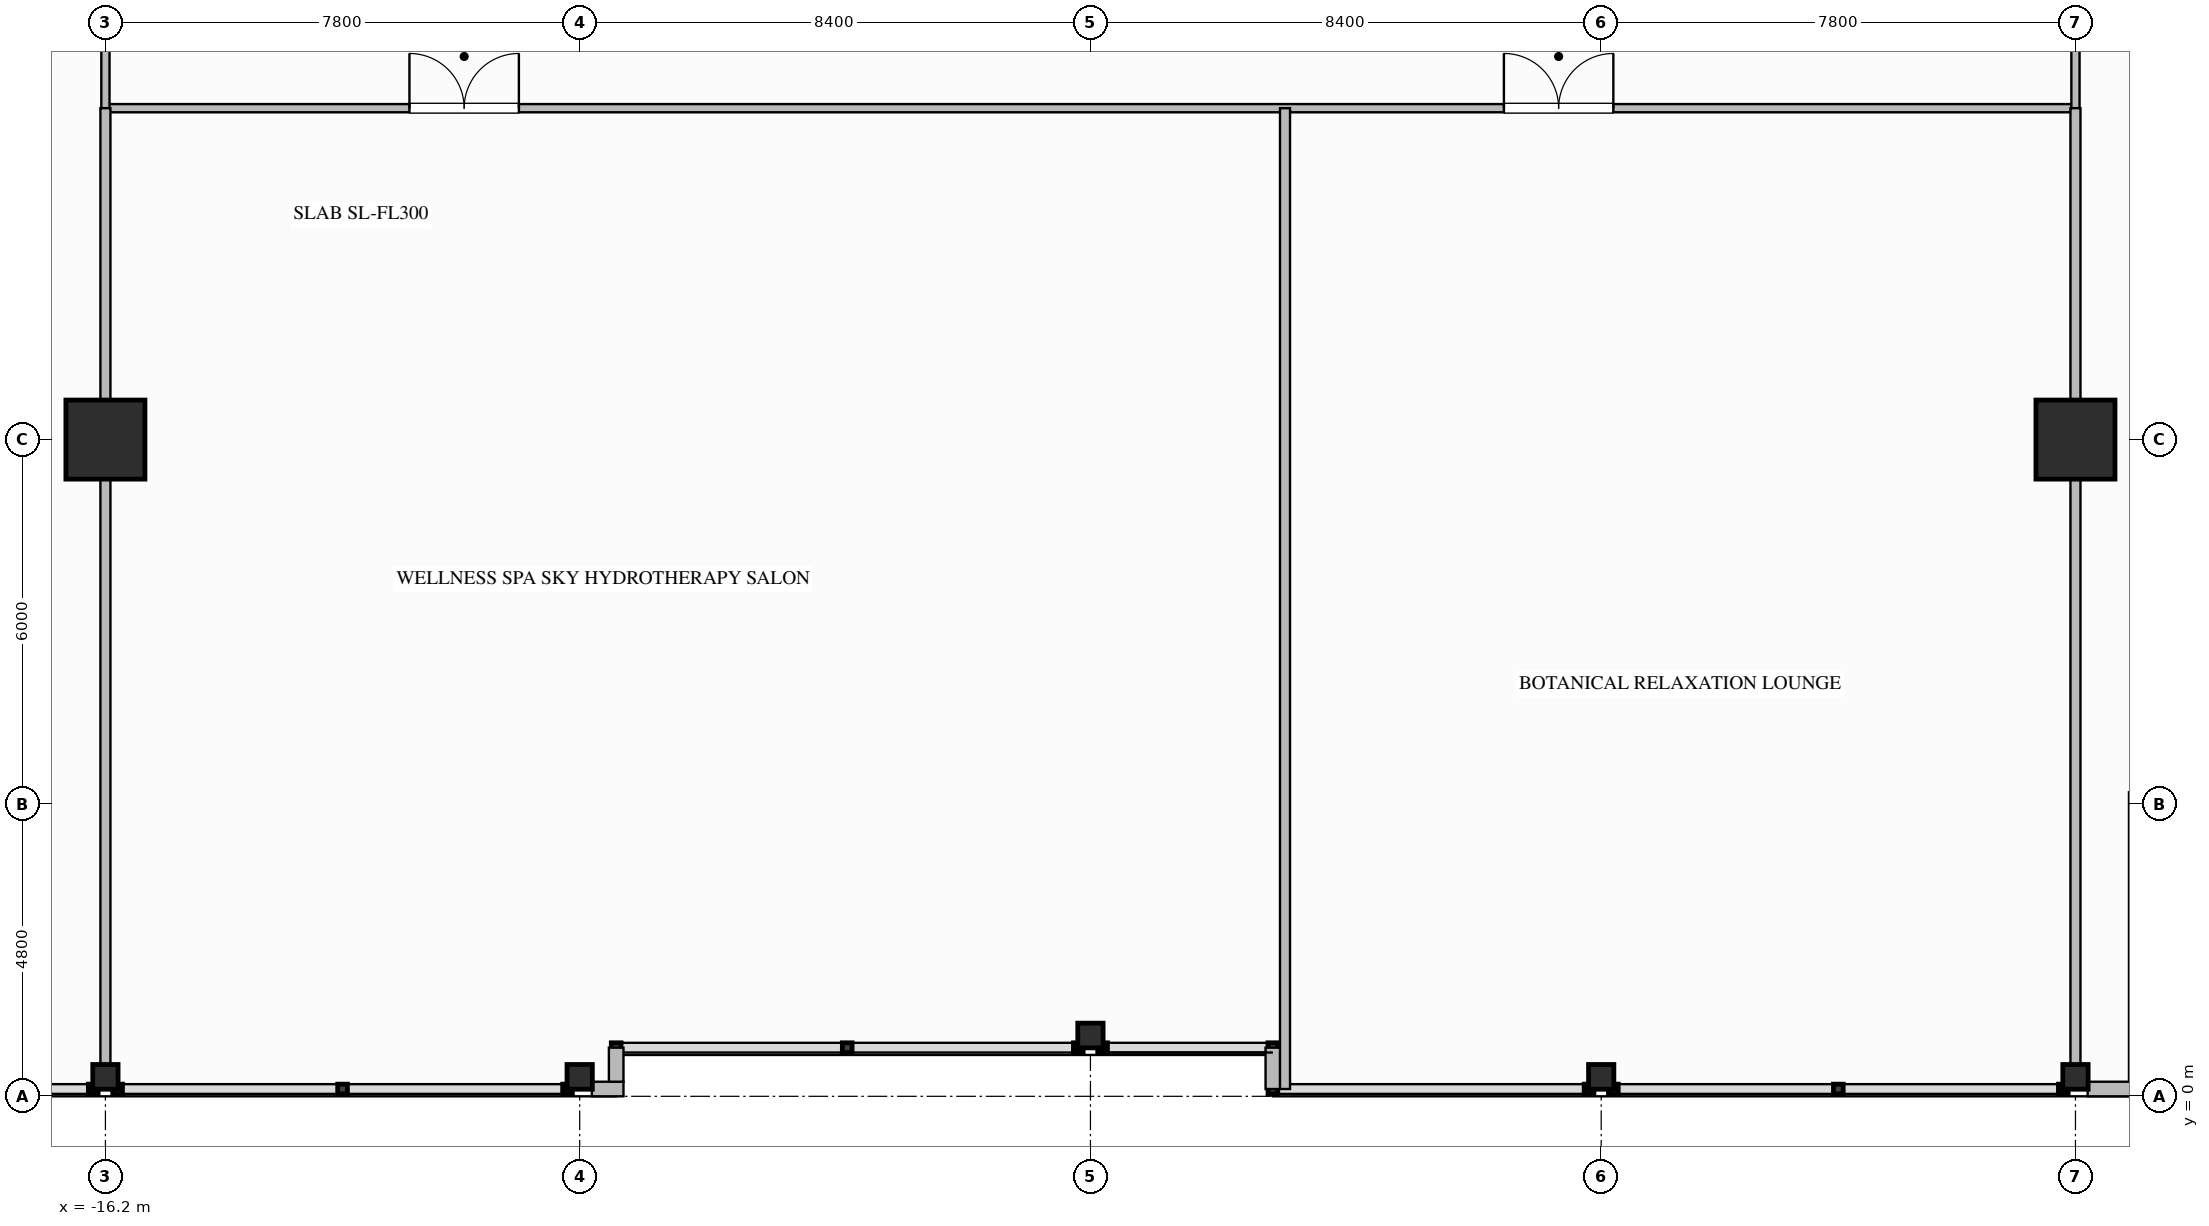
"""IFC4 building model, lengths in metres.
Left out: names, types, materials, properties, quantities, classifications, styles, units other than length and angle.
Written with IfcOpenShell. Run it as: python <this file> out.ifc"""

import sys

from ifc_helpers import new_model, si_unit, direction, frame, frame_2d, origin, origin_2d, place, context, subcontext, project, spatial, rectangle, i_section, extrude, element, fill, save


model = new_model("IFC4")
c1 = context("Model", 3, precision=1e-05, world=origin(), true_north=direction((0.0, 1.0)))
c2 = subcontext(c1, "Body", "Model", "MODEL_VIEW")
j1 = project(units=[si_unit("LENGTHUNIT", "METRE"), si_unit("PLANEANGLEUNIT", "RADIAN")], contexts=[c1])
p1 = place(None, origin())
s1 = spatial("IfcSite", under=j1, at=p1, CompositionType="ELEMENT")
p2 = place(p1, origin())
s2 = spatial("IfcBuilding", under=s1, at=p2, CompositionType="ELEMENT")
p3 = place(p2, frame((0.0, 0.0, 145.8)))
s3 = spatial("IfcBuildingStorey", under=s2, at=p3, CompositionType="ELEMENT", Elevation=145.8)
for number, where, z_axis, x_axis in (
    (1, (-16.2, 10.8, 0.0), (0.0, 0.0, 1.0), (1.0, 0.0, 0.0)),
    (2, (16.2, 10.8, 0.0), (0.0, 0.0, 1.0), (1.0, 0.0, 0.0)),
):
    element("IfcColumn", number, at=place(p3, frame(where, z_axis=z_axis, x_axis=x_axis)), inside=s3, PredefinedType="COLUMN", context=c2, shape_type="SweptSolid", body=[
        extrude(rectangle(XDim=1.3, YDim=1.3, at=origin_2d()), origin(), (0.0, 0.0, 1.0), 4.6),
    ])
for number, where, z_axis, x_axis in (
    (3, (-16.2, 0.32, 0.0), (0.0, 0.0, 1.0), (0.0, 1.0, 0.0)),
    (4, (-8.4, 0.32, 0.0), (0.0, 0.0, 1.0), (0.0, 1.0, 0.0)),
    (5, (0.0, 1.0, 0.0), (0.0, 0.0, 1.0), (0.0, 1.0, 0.0)),
    (6, (8.4, 0.32, 0.0), (0.0, 0.0, 1.0), (0.0, 1.0, 0.0)),
    (7, (16.2, 0.32, 0.0), (0.0, 0.0, 1.0), (0.0, 1.0, 0.0)),
):
    element("IfcColumn", number, at=place(p3, frame(where, z_axis=z_axis, x_axis=x_axis)), inside=s3, PredefinedType="COLUMN", context=c2, shape_type="SweptSolid", body=[
        extrude(i_section(OverallWidth=0.406, OverallDepth=0.416, WebThickness=0.03, FlangeThickness=0.048, FilletRadius=0.028, at=origin_2d()), origin(), (0.0, 0.0, 1.0), 4.597),
    ])
p4 = place(p3, frame((17.32, 0.12, 0.0), z_axis=(0.0, 0.0, 1.0), x_axis=(-1.0, 0.0, 0.0)))
e8 = element("IfcWall", 8, at=p4, inside=s3, PredefinedType="STANDARD", context=c2, shape_type="SweptSolid", body=[
    extrude(rectangle(XDim=0.92, YDim=0.24, at=frame_2d((0.46, 0.0))), origin(), (0.0, 0.0, 1.0), 4.34),
])
p5 = place(p3, frame((-7.68, 0.12, 0.0), z_axis=(0.0, 0.0, 1.0), x_axis=(-1.0, 0.0, 0.0)))
e9 = element("IfcWall", 9, at=p5, inside=s3, PredefinedType="STANDARD", context=c2, shape_type="SweptSolid", body=[
    extrude(rectangle(XDim=0.52, YDim=0.24, at=frame_2d((0.26, 0.0))), origin(), (0.0, 0.0, 1.0), 4.34),
])
p6 = place(p3, frame((17.2, 5.0, 0.0), z_axis=(0.0, 0.0, 1.0), x_axis=(0.0, -1.0, 0.0)))
e10 = element("IfcWall", 10, at=p6, inside=s3, PredefinedType="STANDARD", context=c2, shape_type="SweptSolid", body=[
    extrude(rectangle(XDim=4.76, YDim=0.24, at=frame_2d((2.38, 0.0))), origin(), (0.0, 0.0, 1.0), 4.34),
])
p7 = place(p3, frame((3.0, 0.12, 0.0), z_axis=(0.0, 0.0, 1.0), x_axis=(0.0, 1.0, 0.0)))
e11 = element("IfcWall", 11, at=p7, inside=s3, PredefinedType="STANDARD", context=c2, shape_type="SweptSolid", body=[
    extrude(rectangle(XDim=0.68, YDim=0.24, at=frame_2d((0.34, 0.0))), origin(), (0.0, 0.0, 1.0), 4.34),
])
p8 = place(p3, frame((-7.8, 0.8, 0.0), z_axis=(0.0, 0.0, 1.0), x_axis=(0.0, -1.0, 0.0)))
e12 = element("IfcWall", 12, at=p8, inside=s3, PredefinedType="STANDARD", context=c2, shape_type="SweptSolid", body=[
    extrude(rectangle(XDim=0.56, YDim=0.24, at=frame_2d((0.28, 0.0))), origin(), (0.0, 0.0, 1.0), 4.34),
])
p9 = place(p3, frame((-16.2, 16.25, 0.0), z_axis=(0.0, 0.0, 1.0), x_axis=(1.0, 0.0, 0.0)))
e13 = element("IfcWall", 13, at=p9, inside=s3, PredefinedType="PARTITIONING", context=c2, shape_type="SweptSolid", body=[
    extrude(rectangle(XDim=32.4, YDim=0.135, at=frame_2d((16.2, 0.0))), origin(), (0.0, 0.0, 1.0), 4.34),
])
p10 = place(p9, frame((5.0, 0.0, 0.0)))
e14 = element("IfcOpeningElement", 14, at=p10, cuts=e13, PredefinedType="OPENING", context=c2, shape_type="SweptSolid", body=[
    extrude(rectangle(XDim=1.8, YDim=2.35, at=frame_2d((0.9, 1.175))), frame((0.0, 0.077, 0.0), z_axis=(0.0, -1.0, 0.0), x_axis=(1.0, 0.0, 0.0)), (0.0, 0.0, 1.0), 0.155),
])
p11 = place(p9, frame((23.0, 0.0, 0.0)))
e15 = element("IfcOpeningElement", 15, at=p11, cuts=e13, PredefinedType="OPENING", context=c2, shape_type="SweptSolid", body=[
    extrude(rectangle(XDim=1.8, YDim=2.35, at=frame_2d((0.9, 1.175))), frame((0.0, 0.077, 0.0), z_axis=(0.0, -1.0, 0.0), x_axis=(1.0, 0.0, 0.0)), (0.0, 0.0, 1.0), 0.155),
])
for number, where, z_axis, x_axis in (
    (16, (-16.2, 16.25, 0.0), (0.0, 0.0, 1.0), (0.0, 1.0, 0.0)),
    (17, (16.2, 16.25, 0.0), (0.0, 0.0, 1.0), (0.0, 1.0, 0.0)),
):
    element("IfcWall", number, at=place(p3, frame(where, z_axis=z_axis, x_axis=x_axis)), inside=s3, PredefinedType="PARTITIONING", context=c2, shape_type="SweptSolid", body=[
        extrude(rectangle(XDim=2.15, YDim=0.135, at=frame_2d((1.075, 0.0))), origin(), (0.0, 0.0, 1.0), 3.629),
    ])
for number, where, z_axis, x_axis in (
    (18, (-16.2, 0.12, 0.0), (0.0, 0.0, 1.0), (0.0, 1.0, 0.0)),
    (19, (16.2, 0.12, 0.0), (0.0, 0.0, 1.0), (0.0, 1.0, 0.0)),
):
    element("IfcWall", number, at=place(p3, frame(where, z_axis=z_axis, x_axis=x_axis)), inside=s3, PredefinedType="PARTITIONING", context=c2, shape_type="SweptSolid", body=[
        extrude(rectangle(XDim=16.13, YDim=0.165, at=frame_2d((8.065, 0.0))), origin(), (0.0, 0.0, 1.0), 3.629),
    ])
p12 = place(p3, frame((3.2, 0.12, 0.0), z_axis=(0.0, 0.0, 1.0), x_axis=(0.0, 1.0, 0.0)))
e20 = element("IfcWall", 20, at=p12, inside=s3, PredefinedType="PARTITIONING", context=c2, shape_type="SweptSolid", body=[
    extrude(rectangle(XDim=16.13, YDim=0.165, at=frame_2d((8.065, 0.0))), origin(), (0.0, 0.0, 1.0), 4.34),
])
p13 = place(p10, origin())
e21 = element("IfcDoor", 21, at=p13, inside=s3, OperationType="DOUBLE_DOOR_SINGLE_SWING", PredefinedType="DOOR", context=c2, shape_type="SweptSolid", body=[
    extrude(rectangle(XDim=1.8, YDim=2.35, at=frame_2d((0.9, 1.175))), frame((0.0, 0.025, 0.0), z_axis=(0.0, -1.0, 0.0), x_axis=(1.0, 0.0, 0.0)), (0.0, 0.0, 1.0), 0.05),
])
fill(e14, e21)
p14 = place(p11, origin())
e22 = element("IfcDoor", 22, at=p14, inside=s3, OperationType="DOUBLE_DOOR_SINGLE_SWING", PredefinedType="DOOR", context=c2, shape_type="SweptSolid", body=[
    extrude(rectangle(XDim=1.8, YDim=2.35, at=frame_2d((0.9, 1.175))), frame((0.0, 0.025, 0.0), z_axis=(0.0, -1.0, 0.0), x_axis=(1.0, 0.0, 0.0)), (0.0, 0.0, 1.0), 0.05),
])
fill(e15, e22)
save(model, sys.argv[1])
